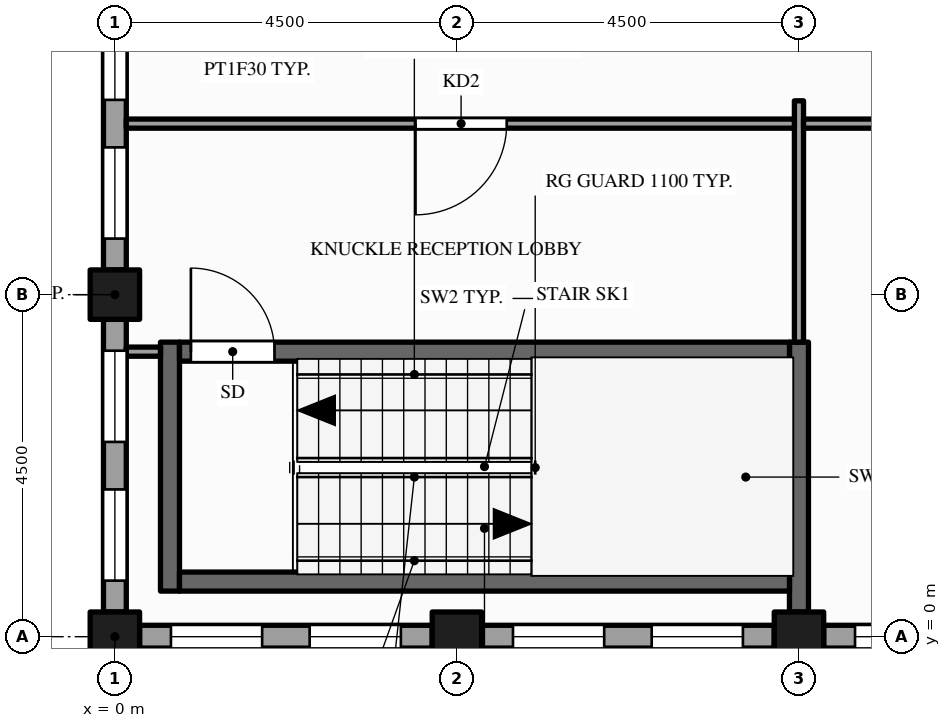
"""IFC4 building model, lengths in metres.
Left out: names, types, materials, properties, quantities, classifications, styles, units other than length and angle.
Written with IfcOpenShell. Run it as: python <this file> out.ifc"""

import sys

from ifc_helpers import new_model, si_unit, direction, frame, frame_2d, origin, origin_2d, place, context, subcontext, project, spatial, rectangle, hollow_rectangle, extrude, element, fill, save


model = new_model("IFC4")
c1 = context("Model", 3, precision=1e-05, world=origin(), true_north=direction((0.0, 1.0)))
c2 = subcontext(c1, "Body", "Model", "MODEL_VIEW")
j1 = project(units=[si_unit("LENGTHUNIT", "METRE"), si_unit("PLANEANGLEUNIT", "RADIAN")], contexts=[c1])
p1 = place(None, origin())
s1 = spatial("IfcSite", under=j1, at=p1, CompositionType="ELEMENT")
p2 = place(p1, origin())
s2 = spatial("IfcBuilding", under=s1, at=p2, CompositionType="ELEMENT")
p3 = place(p2, frame((0.0, 0.0, 269.0)))
s3 = spatial("IfcBuildingStorey", under=s2, at=p3, CompositionType="ELEMENT", Elevation=269.0)
for number, where, z_axis, x_axis in (
    (1, (0.0, 0.0, -0.15), (0.0, 0.0, 1.0), (1.0, 0.0, 0.0)),
    (2, (0.0, 4.5, -0.15), (0.0, 0.0, 1.0), (1.0, 0.0, 0.0)),
    (3, (4.5, 0.0, -0.15), (0.0, 0.0, 1.0), (1.0, 0.0, 0.0)),
    (4, (9.0, 0.0, -0.15), (0.0, 0.0, 1.0), (1.0, 0.0, 0.0)),
):
    element("IfcColumn", number, at=place(p3, frame(where, z_axis=z_axis, x_axis=x_axis)), inside=s3, PredefinedType="COLUMN", context=c2, shape_type="SweptSolid", body=[
        extrude(hollow_rectangle(XDim=0.65, YDim=0.65, WallThickness=0.032, at=origin_2d()), origin(), (0.0, 0.0, 1.0), 4.0),
    ])
p4 = place(p3, frame((0.0, 8.675, 0.0), z_axis=(0.0, 0.0, 1.0), x_axis=(0.0, -1.0, 0.0)))
e5 = element("IfcWall", 5, at=p4, inside=s3, PredefinedType="STANDARD", context=c2, shape_type="SweptSolid", body=[
    extrude(rectangle(XDim=3.85, YDim=0.3, at=frame_2d((1.925, 0.0))), origin(), (0.0, 0.0, 1.0), 3.162),
])
p5 = place(p4, frame((0.413, 0.0, 0.9)))
e6 = element("IfcOpeningElement", 6, at=p5, cuts=e5, PredefinedType="OPENING", context=c2, shape_type="SweptSolid", body=[
    extrude(rectangle(XDim=1.2, YDim=2.0, at=frame_2d((0.6, 1.0))), frame((0.0, 0.16, 0.0), z_axis=(0.0, -1.0, 0.0), x_axis=(1.0, 0.0, 0.0)), (0.0, 0.0, 1.0), 0.32),
])
p6 = place(p4, frame((2.238, 0.0, 0.9)))
e7 = element("IfcOpeningElement", 7, at=p6, cuts=e5, PredefinedType="OPENING", context=c2, shape_type="SweptSolid", body=[
    extrude(rectangle(XDim=1.2, YDim=2.0, at=frame_2d((0.6, 1.0))), frame((0.0, 0.16, 0.0), z_axis=(0.0, -1.0, 0.0), x_axis=(1.0, 0.0, 0.0)), (0.0, 0.0, 1.0), 0.32),
])
p7 = place(p3, frame((0.0, 4.175, 0.0), z_axis=(0.0, 0.0, 1.0), x_axis=(0.0, -1.0, 0.0)))
e8 = element("IfcWall", 8, at=p7, inside=s3, PredefinedType="STANDARD", context=c2, shape_type="SweptSolid", body=[
    extrude(rectangle(XDim=3.85, YDim=0.3, at=frame_2d((1.925, 0.0))), origin(), (0.0, 0.0, 1.0), 3.162),
])
p8 = place(p7, frame((0.413, 0.0, 0.9)))
e9 = element("IfcOpeningElement", 9, at=p8, cuts=e8, PredefinedType="OPENING", context=c2, shape_type="SweptSolid", body=[
    extrude(rectangle(XDim=1.2, YDim=2.0, at=frame_2d((0.6, 1.0))), frame((0.0, 0.16, 0.0), z_axis=(0.0, -1.0, 0.0), x_axis=(1.0, 0.0, 0.0)), (0.0, 0.0, 1.0), 0.32),
])
p9 = place(p7, frame((2.238, 0.0, 0.9)))
e10 = element("IfcOpeningElement", 10, at=p9, cuts=e8, PredefinedType="OPENING", context=c2, shape_type="SweptSolid", body=[
    extrude(rectangle(XDim=1.2, YDim=2.0, at=frame_2d((0.6, 1.0))), frame((0.0, 0.16, 0.0), z_axis=(0.0, -1.0, 0.0), x_axis=(1.0, 0.0, 0.0)), (0.0, 0.0, 1.0), 0.32),
])
p10 = place(p3, frame((0.325, 0.0, 0.0), z_axis=(0.0, 0.0, 1.0), x_axis=(1.0, 0.0, 0.0)))
e11 = element("IfcWall", 11, at=p10, inside=s3, PredefinedType="STANDARD", context=c2, shape_type="SweptSolid", body=[
    extrude(rectangle(XDim=3.85, YDim=0.3, at=frame_2d((1.925, 0.0))), origin(), (0.0, 0.0, 1.0), 3.162),
])
p11 = place(p10, frame((0.413, 0.0, 0.9)))
e12 = element("IfcOpeningElement", 12, at=p11, cuts=e11, PredefinedType="OPENING", context=c2, shape_type="SweptSolid", body=[
    extrude(rectangle(XDim=1.2, YDim=2.0, at=frame_2d((0.6, 1.0))), frame((0.0, 0.16, 0.0), z_axis=(0.0, -1.0, 0.0), x_axis=(1.0, 0.0, 0.0)), (0.0, 0.0, 1.0), 0.32),
])
p12 = place(p10, frame((2.238, 0.0, 0.9)))
e13 = element("IfcOpeningElement", 13, at=p12, cuts=e11, PredefinedType="OPENING", context=c2, shape_type="SweptSolid", body=[
    extrude(rectangle(XDim=1.2, YDim=2.0, at=frame_2d((0.6, 1.0))), frame((0.0, 0.16, 0.0), z_axis=(0.0, -1.0, 0.0), x_axis=(1.0, 0.0, 0.0)), (0.0, 0.0, 1.0), 0.32),
])
p13 = place(p3, frame((4.825, 0.0, 0.0), z_axis=(0.0, 0.0, 1.0), x_axis=(1.0, 0.0, 0.0)))
e14 = element("IfcWall", 14, at=p13, inside=s3, PredefinedType="STANDARD", context=c2, shape_type="SweptSolid", body=[
    extrude(rectangle(XDim=3.85, YDim=0.3, at=frame_2d((1.925, 0.0))), origin(), (0.0, 0.0, 1.0), 3.162),
])
p14 = place(p13, frame((0.413, 0.0, 0.9)))
e15 = element("IfcOpeningElement", 15, at=p14, cuts=e14, PredefinedType="OPENING", context=c2, shape_type="SweptSolid", body=[
    extrude(rectangle(XDim=1.2, YDim=2.0, at=frame_2d((0.6, 1.0))), frame((0.0, 0.16, 0.0), z_axis=(0.0, -1.0, 0.0), x_axis=(1.0, 0.0, 0.0)), (0.0, 0.0, 1.0), 0.32),
])
p15 = place(p13, frame((2.238, 0.0, 0.9)))
e16 = element("IfcOpeningElement", 16, at=p15, cuts=e14, PredefinedType="OPENING", context=c2, shape_type="SweptSolid", body=[
    extrude(rectangle(XDim=1.2, YDim=2.0, at=frame_2d((0.6, 1.0))), frame((0.0, 0.16, 0.0), z_axis=(0.0, -1.0, 0.0), x_axis=(1.0, 0.0, 0.0)), (0.0, 0.0, 1.0), 0.32),
])
p16 = place(p3, frame((9.325, 0.0, 0.0), z_axis=(0.0, 0.0, 1.0), x_axis=(1.0, 0.0, 0.0)))
e17 = element("IfcWall", 17, at=p16, inside=s3, PredefinedType="STANDARD", context=c2, shape_type="SweptSolid", body=[
    extrude(rectangle(XDim=3.85, YDim=0.3, at=frame_2d((1.925, 0.0))), origin(), (0.0, 0.0, 1.0), 2.87),
])
p17 = place(p16, frame((0.413, 0.0, 0.9)))
e18 = element("IfcOpeningElement", 18, at=p17, cuts=e17, PredefinedType="OPENING", context=c2, shape_type="SweptSolid", body=[
    extrude(rectangle(XDim=1.2, YDim=1.75, at=frame_2d((0.6, 0.875))), frame((0.0, 0.16, 0.0), z_axis=(0.0, -1.0, 0.0), x_axis=(1.0, 0.0, 0.0)), (0.0, 0.0, 1.0), 0.32),
])
p18 = place(p16, frame((2.238, 0.0, 0.9)))
e19 = element("IfcOpeningElement", 19, at=p18, cuts=e17, PredefinedType="OPENING", context=c2, shape_type="SweptSolid", body=[
    extrude(rectangle(XDim=1.2, YDim=1.75, at=frame_2d((0.6, 0.875))), frame((0.0, 0.16, 0.0), z_axis=(0.0, -1.0, 0.0), x_axis=(1.0, 0.0, 0.0)), (0.0, 0.0, 1.0), 0.32),
])
p19 = place(p3, frame((0.725, 0.6, 0.0), z_axis=(0.0, 0.0, 1.0), x_axis=(0.0, 1.0, 0.0)))
e20 = element("IfcWall", 20, at=p19, inside=s3, PredefinedType="SHEAR", context=c2, shape_type="SweptSolid", body=[
    extrude(rectangle(XDim=3.275, YDim=0.25, at=frame_2d((1.637, 0.0))), origin(), (0.0, 0.0, 1.0), 3.85),
])
p20 = place(p3, frame((9.0, 0.325, 0.0), z_axis=(0.0, 0.0, 1.0), x_axis=(0.0, 1.0, 0.0)))
e21 = element("IfcWall", 21, at=p20, inside=s3, PredefinedType="SHEAR", context=c2, shape_type="SweptSolid", body=[
    extrude(rectangle(XDim=3.55, YDim=0.25, at=frame_2d((1.775, 0.0))), origin(), (0.0, 0.0, 1.0), 3.85),
])
p21 = place(p3, frame((9.0, 3.875, 0.0), z_axis=(0.0, 0.0, 1.0), x_axis=(0.0, 1.0, 0.0)))
e22 = element("IfcWall", 22, at=p21, inside=s3, PredefinedType="PARTITIONING", context=c2, shape_type="SweptSolid", body=[
    extrude(rectangle(XDim=3.175, YDim=0.12, at=frame_2d((1.587, 0.0))), origin(), (0.0, 0.0, 1.0), 2.87),
])
p22 = place(p3, frame((0.85, 0.725, 0.0), z_axis=(0.0, 0.0, 1.0), x_axis=(1.0, 0.0, 0.0)))
e23 = element("IfcWall", 23, at=p22, inside=s3, PredefinedType="SHEAR", context=c2, shape_type="SweptSolid", body=[
    extrude(rectangle(XDim=8.025, YDim=0.25, at=frame_2d((4.012, 0.0))), origin(), (0.0, 0.0, 1.0), 3.85),
])
p23 = place(p3, frame((0.15, 3.75, 0.0), z_axis=(0.0, 0.0, 1.0), x_axis=(1.0, 0.0, 0.0)))
e24 = element("IfcWall", 24, at=p23, inside=s3, PredefinedType="PARTITIONING", context=c2, shape_type="SweptSolid", body=[
    extrude(rectangle(XDim=0.45, YDim=0.12, at=frame_2d((0.225, 0.0))), origin(), (0.0, 0.0, 1.0), 3.85),
])
p24 = place(p3, frame((0.85, 3.75, 0.0), z_axis=(0.0, 0.0, 1.0), x_axis=(1.0, 0.0, 0.0)))
e25 = element("IfcWall", 25, at=p24, inside=s3, PredefinedType="SHEAR", context=c2, shape_type="SweptSolid", body=[
    extrude(rectangle(XDim=8.025, YDim=0.25, at=frame_2d((4.012, 0.0))), origin(), (0.0, 0.0, 1.0), 3.85),
])
p25 = place(p24, frame((0.15, 0.0, 0.0)))
e26 = element("IfcOpeningElement", 26, at=p25, cuts=e25, PredefinedType="OPENING", context=c2, shape_type="SweptSolid", body=[
    extrude(rectangle(XDim=1.1, YDim=2.1, at=frame_2d((0.55, 1.05))), frame((0.0, 0.135, 0.0), z_axis=(0.0, -1.0, 0.0), x_axis=(1.0, 0.0, 0.0)), (0.0, 0.0, 1.0), 0.27),
])
p26 = place(p3, frame((0.15, 6.75, 0.0), z_axis=(0.0, 0.0, 1.0), x_axis=(1.0, 0.0, 0.0)))
e27 = element("IfcWall", 27, at=p26, inside=s3, PredefinedType="PARTITIONING", context=c2, shape_type="SweptSolid", body=[
    extrude(rectangle(XDim=8.79, YDim=0.12, at=frame_2d((4.395, 0.0))), origin(), (0.0, 0.0, 1.0), 2.87),
])
p27 = place(p26, frame((3.805, 0.0, 0.0)))
e28 = element("IfcOpeningElement", 28, at=p27, cuts=e27, PredefinedType="OPENING", context=c2, shape_type="SweptSolid", body=[
    extrude(rectangle(XDim=1.2, YDim=2.1, at=frame_2d((0.6, 1.05))), frame((0.0, 0.07, 0.0), z_axis=(0.0, -1.0, 0.0), x_axis=(1.0, 0.0, 0.0)), (0.0, 0.0, 1.0), 0.14),
])
p28 = place(p3, frame((9.06, 6.75, 0.0), z_axis=(0.0, 0.0, 1.0), x_axis=(1.0, 0.0, 0.0)))
e29 = element("IfcWall", 29, at=p28, inside=s3, PredefinedType="PARTITIONING", context=c2, shape_type="SweptSolid", body=[
    extrude(rectangle(XDim=4.38, YDim=0.12, at=frame_2d((2.19, 0.0))), origin(), (0.0, 0.0, 1.0), 2.87),
])
p29 = place(p28, frame((1.69, 0.0, 0.0)))
e30 = element("IfcOpeningElement", 30, at=p29, cuts=e29, PredefinedType="OPENING", context=c2, shape_type="SweptSolid", body=[
    extrude(rectangle(XDim=1.0, YDim=2.1, at=frame_2d((0.5, 1.05))), frame((0.0, 0.07, 0.0), z_axis=(0.0, -1.0, 0.0), x_axis=(1.0, 0.0, 0.0)), (0.0, 0.0, 1.0), 0.14),
])
p30 = place(p5, origin())
e31 = element("IfcWindow", 31, at=p30, inside=s3, PartitioningType="SINGLE_PANEL", PredefinedType="WINDOW", context=c2, shape_type="SweptSolid", body=[
    extrude(rectangle(XDim=1.2, YDim=2.0, at=frame_2d((0.6, 1.0))), frame((0.0, 0.03, 0.0), z_axis=(0.0, -1.0, 0.0), x_axis=(1.0, 0.0, 0.0)), (0.0, 0.0, 1.0), 0.06),
])
fill(e6, e31)
p31 = place(p6, origin())
e32 = element("IfcWindow", 32, at=p31, inside=s3, PartitioningType="SINGLE_PANEL", PredefinedType="WINDOW", context=c2, shape_type="SweptSolid", body=[
    extrude(rectangle(XDim=1.2, YDim=2.0, at=frame_2d((0.6, 1.0))), frame((0.0, 0.03, 0.0), z_axis=(0.0, -1.0, 0.0), x_axis=(1.0, 0.0, 0.0)), (0.0, 0.0, 1.0), 0.06),
])
fill(e7, e32)
p32 = place(p8, origin())
e33 = element("IfcWindow", 33, at=p32, inside=s3, PartitioningType="SINGLE_PANEL", PredefinedType="WINDOW", context=c2, shape_type="SweptSolid", body=[
    extrude(rectangle(XDim=1.2, YDim=2.0, at=frame_2d((0.6, 1.0))), frame((0.0, 0.03, 0.0), z_axis=(0.0, -1.0, 0.0), x_axis=(1.0, 0.0, 0.0)), (0.0, 0.0, 1.0), 0.06),
])
fill(e9, e33)
p33 = place(p9, origin())
e34 = element("IfcWindow", 34, at=p33, inside=s3, PartitioningType="SINGLE_PANEL", PredefinedType="WINDOW", context=c2, shape_type="SweptSolid", body=[
    extrude(rectangle(XDim=1.2, YDim=2.0, at=frame_2d((0.6, 1.0))), frame((0.0, 0.03, 0.0), z_axis=(0.0, -1.0, 0.0), x_axis=(1.0, 0.0, 0.0)), (0.0, 0.0, 1.0), 0.06),
])
fill(e10, e34)
p34 = place(p11, origin())
e35 = element("IfcWindow", 35, at=p34, inside=s3, PartitioningType="SINGLE_PANEL", PredefinedType="WINDOW", context=c2, shape_type="SweptSolid", body=[
    extrude(rectangle(XDim=1.2, YDim=2.0, at=frame_2d((0.6, 1.0))), frame((0.0, 0.03, 0.0), z_axis=(0.0, -1.0, 0.0), x_axis=(1.0, 0.0, 0.0)), (0.0, 0.0, 1.0), 0.06),
])
fill(e12, e35)
p35 = place(p12, origin())
e36 = element("IfcWindow", 36, at=p35, inside=s3, PartitioningType="SINGLE_PANEL", PredefinedType="WINDOW", context=c2, shape_type="SweptSolid", body=[
    extrude(rectangle(XDim=1.2, YDim=2.0, at=frame_2d((0.6, 1.0))), frame((0.0, 0.03, 0.0), z_axis=(0.0, -1.0, 0.0), x_axis=(1.0, 0.0, 0.0)), (0.0, 0.0, 1.0), 0.06),
])
fill(e13, e36)
p36 = place(p14, origin())
e37 = element("IfcWindow", 37, at=p36, inside=s3, PartitioningType="SINGLE_PANEL", PredefinedType="WINDOW", context=c2, shape_type="SweptSolid", body=[
    extrude(rectangle(XDim=1.2, YDim=2.0, at=frame_2d((0.6, 1.0))), frame((0.0, 0.03, 0.0), z_axis=(0.0, -1.0, 0.0), x_axis=(1.0, 0.0, 0.0)), (0.0, 0.0, 1.0), 0.06),
])
fill(e15, e37)
p37 = place(p15, origin())
e38 = element("IfcWindow", 38, at=p37, inside=s3, PartitioningType="SINGLE_PANEL", PredefinedType="WINDOW", context=c2, shape_type="SweptSolid", body=[
    extrude(rectangle(XDim=1.2, YDim=2.0, at=frame_2d((0.6, 1.0))), frame((0.0, 0.03, 0.0), z_axis=(0.0, -1.0, 0.0), x_axis=(1.0, 0.0, 0.0)), (0.0, 0.0, 1.0), 0.06),
])
fill(e16, e38)
p38 = place(p17, origin())
e39 = element("IfcWindow", 39, at=p38, inside=s3, PartitioningType="SINGLE_PANEL", PredefinedType="WINDOW", context=c2, shape_type="SweptSolid", body=[
    extrude(rectangle(XDim=1.2, YDim=1.75, at=frame_2d((0.6, 0.875))), frame((0.0, 0.03, 0.0), z_axis=(0.0, -1.0, 0.0), x_axis=(1.0, 0.0, 0.0)), (0.0, 0.0, 1.0), 0.06),
])
fill(e18, e39)
p39 = place(p25, origin())
e40 = element("IfcDoor", 40, at=p39, inside=s3, OperationType="SINGLE_SWING_LEFT", PredefinedType="DOOR", context=c2, shape_type="SweptSolid", body=[
    extrude(rectangle(XDim=1.1, YDim=2.1, at=frame_2d((0.55, 1.05))), frame((0.0, 0.025, 0.0), z_axis=(0.0, -1.0, 0.0), x_axis=(1.0, 0.0, 0.0)), (0.0, 0.0, 1.0), 0.05),
])
fill(e26, e40)
p40 = place(p27, origin())
e41 = element("IfcDoor", 41, at=p40, inside=s3, OperationType="SINGLE_SWING_LEFT", PredefinedType="DOOR", context=c2, shape_type="SweptSolid", body=[
    extrude(rectangle(XDim=1.2, YDim=2.1, at=frame_2d((0.6, 1.05))), frame((0.0, 0.025, 0.0), z_axis=(0.0, -1.0, 0.0), x_axis=(1.0, 0.0, 0.0)), (0.0, 0.0, 1.0), 0.05),
])
fill(e28, e41)
save(model, sys.argv[1])
